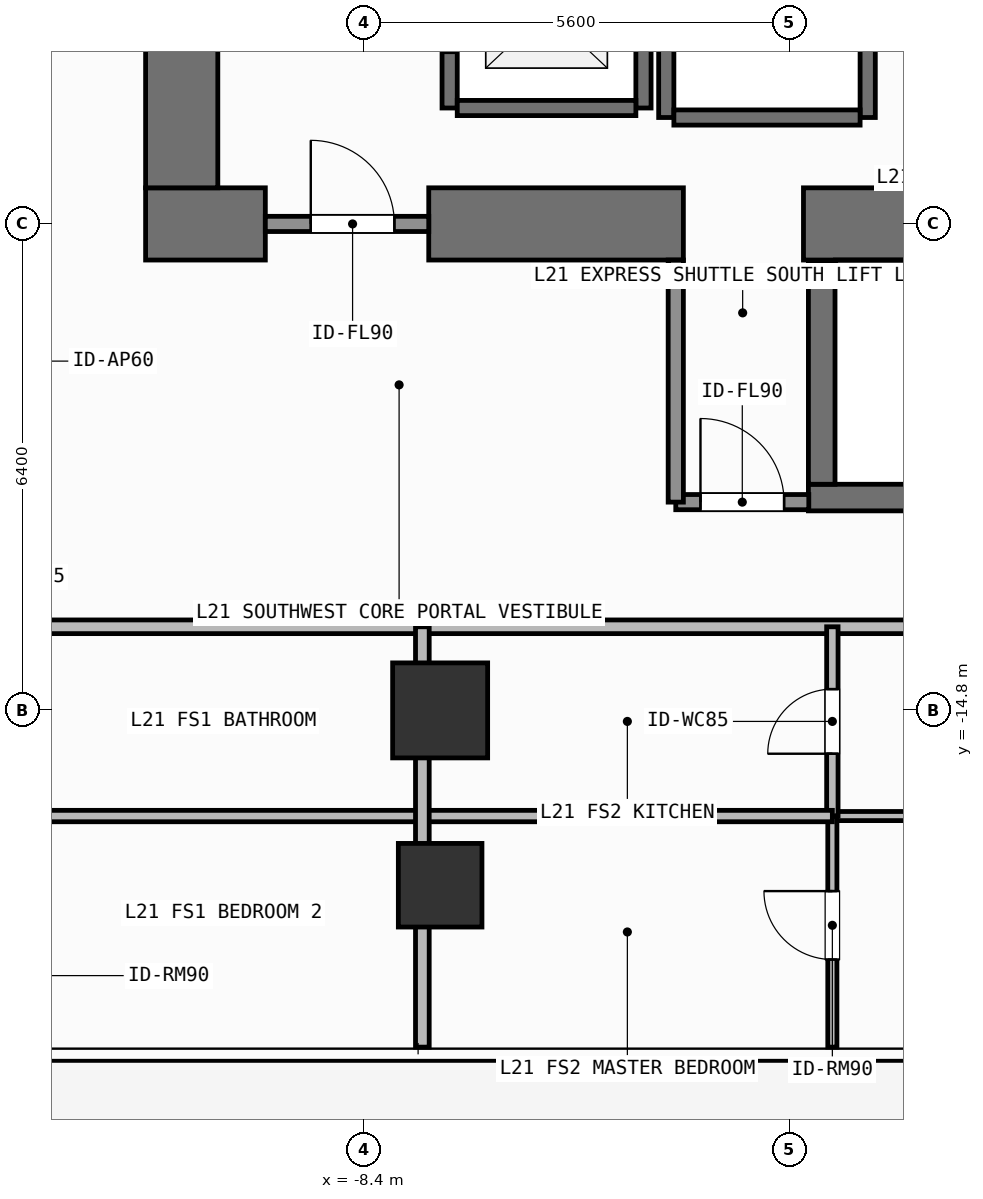
"""IFC4 building model, lengths in metres.
Left out: names, types, materials, properties, quantities, classifications, styles, units other than length and angle.
Written with IfcOpenShell. Run it as: python <this file> out.ifc"""

import sys

from ifc_helpers import new_model, si_unit, direction, frame, frame_2d, origin, origin_2d, place, context, subcontext, project, spatial, rectangle, extrude, element, fill, save


model = new_model("IFC4")
c1 = context("Model", 3, precision=1e-05, world=origin(), true_north=direction((0.0, 1.0)))
c2 = subcontext(c1, "Body", "Model", "MODEL_VIEW")
j1 = project(units=[si_unit("LENGTHUNIT", "METRE"), si_unit("PLANEANGLEUNIT", "RADIAN")], contexts=[c1])
p1 = place(None, origin())
s1 = spatial("IfcSite", under=j1, at=p1, CompositionType="ELEMENT")
p2 = place(p1, origin())
s2 = spatial("IfcBuilding", under=s1, at=p2, CompositionType="ELEMENT")
p3 = place(p2, frame((0.0, 0.0, 85.2)))
s3 = spatial("IfcBuildingStorey", under=s2, at=p3, CompositionType="ELEMENT", Elevation=85.2)
p4 = place(p3, frame((-11.275, -8.4, 0.0), z_axis=(0.0, 0.0, 1.0), x_axis=(1.0, 0.0, 0.0)))
e1 = element("IfcWall", 1, at=p4, inside=s3, PredefinedType="SHEAR", context=c2, shape_type="SweptSolid", body=[
    extrude(rectangle(XDim=1.575, YDim=0.95, at=frame_2d((0.788, 0.0))), origin(), (0.0, 0.0, 1.0), 3.9),
])
p5 = place(p3, frame((-7.55, -8.4, 0.0), z_axis=(0.0, 0.0, 1.0), x_axis=(1.0, 0.0, 0.0)))
e2 = element("IfcWall", 2, at=p5, inside=s3, PredefinedType="SHEAR", context=c2, shape_type="SweptSolid", body=[
    extrude(rectangle(XDim=3.35, YDim=0.95, at=frame_2d((1.675, 0.0))), origin(), (0.0, 0.0, 1.0), 3.9),
])
p6 = place(p3, frame((-2.62, -8.4, 0.0), z_axis=(0.0, 0.0, 1.0), x_axis=(1.0, 0.0, 0.0)))
e3 = element("IfcWall", 3, at=p6, inside=s3, PredefinedType="SHEAR", context=c2, shape_type="SweptSolid", body=[
    extrude(rectangle(XDim=7.27, YDim=0.95, at=frame_2d((3.635, 0.0))), origin(), (0.0, 0.0, 1.0), 3.9),
])
p7 = place(p3, frame((-10.8, -7.925, 0.0), z_axis=(0.0, 0.0, 1.0), x_axis=(0.0, 1.0, 0.0)))
e4 = element("IfcWall", 4, at=p7, inside=s3, PredefinedType="SHEAR", context=c2, shape_type="SweptSolid", body=[
    extrude(rectangle(XDim=15.85, YDim=0.95, at=frame_2d((7.925, 0.0))), origin(), (0.0, 0.0, 1.0), 3.9),
])
p8 = place(p3, frame((-2.555, -12.0, 0.0), z_axis=(0.0, 0.0, 1.0), x_axis=(1.0, 0.0, 0.0)))
e5 = element("IfcWall", 5, at=p8, inside=s3, PredefinedType="SHEAR", context=c2, shape_type="SweptSolid", body=[
    extrude(rectangle(XDim=7.31, YDim=0.35, at=frame_2d((3.655, 0.0))), origin(), (0.0, 0.0, 1.0), 3.9),
])
p9 = place(p3, frame((-2.2, -8.95, 0.0), z_axis=(0.0, 0.0, 1.0), x_axis=(1.0, 0.0, 0.0)))
e6 = element("IfcWall", 6, at=p9, inside=s3, PredefinedType="SHEAR", context=c2, shape_type="SweptSolid", body=[
    extrude(rectangle(XDim=6.6, YDim=0.15, at=frame_2d((3.3, 0.0))), origin(), (0.0, 0.0, 1.0), 3.9),
])
p10 = place(p3, frame((-2.38, -11.825, 0.0), z_axis=(0.0, 0.0, 1.0), x_axis=(0.0, 1.0, 0.0)))
e7 = element("IfcWall", 7, at=p10, inside=s3, PredefinedType="SHEAR", context=c2, shape_type="SweptSolid", body=[
    extrude(rectangle(XDim=2.925, YDim=0.35, at=frame_2d((1.462, 0.0))), origin(), (0.0, 0.0, 1.0), 3.9),
])
p11 = place(p3, frame((-7.4, -14.8, 0.0), z_axis=(0.0, 0.0, 1.0), x_axis=(1.0, 0.0, 0.0)))
e8 = element("IfcColumn", 8, at=p11, inside=s3, PredefinedType="COLUMN", context=c2, shape_type="SweptSolid", body=[
    extrude(rectangle(XDim=1.25, YDim=1.25, at=origin_2d()), origin(), (0.0, 0.0, 1.0), 3.9),
])
p12 = place(p3, frame((-7.4, -17.1, 0.0), z_axis=(0.0, 0.0, 1.0), x_axis=(1.0, 0.0, 0.0)))
e9 = element("IfcColumn", 9, at=p12, inside=s3, PredefinedType="COLUMN", context=c2, shape_type="SweptSolid", body=[
    extrude(rectangle(XDim=1.1, YDim=1.1, at=origin_2d()), origin(), (0.0, 0.0, 1.0), 3.9),
])
p13 = place(p3, frame((-7.275, -6.875, 0.0), z_axis=(0.0, 0.0, 1.0), x_axis=(0.0, 1.0, 0.0)))
e10 = element("IfcWall", 10, at=p13, inside=s3, PredefinedType="SHEAR", context=c2, shape_type="SweptSolid", body=[
    extrude(rectangle(XDim=2.55, YDim=0.2, at=frame_2d((1.275, 0.0))), origin(), (0.0, 0.0, 1.0), 3.68),
])
p14 = place(p13, frame((0.725, 0.0, 0.0)))
e11 = element("IfcOpeningElement", 11, at=p14, cuts=e10, PredefinedType="OPENING", context=c2, shape_type="SweptSolid", body=[
    extrude(rectangle(XDim=1.1, YDim=2.2, at=frame_2d((0.55, 1.1))), frame((0.0, 0.11, 0.0), z_axis=(0.0, -1.0, 0.0), x_axis=(1.0, 0.0, 0.0)), (0.0, 0.0, 1.0), 0.22),
])
p15 = place(p3, frame((-4.725, -6.875, 0.0), z_axis=(0.0, 0.0, 1.0), x_axis=(0.0, 1.0, 0.0)))
e12 = element("IfcWall", 12, at=p15, inside=s3, PredefinedType="SHEAR", context=c2, shape_type="SweptSolid", body=[
    extrude(rectangle(XDim=2.55, YDim=0.2, at=frame_2d((1.275, 0.0))), origin(), (0.0, 0.0, 1.0), 3.68),
])
p16 = place(p3, frame((-7.175, -6.875, 0.0), z_axis=(0.0, 0.0, 1.0), x_axis=(1.0, 0.0, 0.0)))
e13 = element("IfcWall", 13, at=p16, inside=s3, PredefinedType="SHEAR", context=c2, shape_type="SweptSolid", body=[
    extrude(rectangle(XDim=2.35, YDim=0.2, at=frame_2d((1.175, 0.0))), origin(), (0.0, 0.0, 1.0), 3.68),
])
for number, where, z_axis, x_axis in (
    (14, (-4.425, -7.0, 0.0), (0.0, 0.0, 1.0), (0.0, 1.0, 0.0)),
    (15, (-1.775, -7.0, 0.0), (0.0, 0.0, 1.0), (0.0, 1.0, 0.0)),
):
    element("IfcWall", number, at=place(p3, frame(where, z_axis=z_axis, x_axis=x_axis)), inside=s3, PredefinedType="SHEAR", context=c2, shape_type="SweptSolid", body=[
        extrude(rectangle(XDim=2.8, YDim=0.2, at=frame_2d((1.4, 0.0))), origin(), (0.0, 0.0, 1.0), 3.68),
    ])
p17 = place(p3, frame((-4.325, -7.0, 0.0), z_axis=(0.0, 0.0, 1.0), x_axis=(1.0, 0.0, 0.0)))
e16 = element("IfcWall", 16, at=p17, inside=s3, PredefinedType="SHEAR", context=c2, shape_type="SweptSolid", body=[
    extrude(rectangle(XDim=2.45, YDim=0.2, at=frame_2d((1.225, 0.0))), origin(), (0.0, 0.0, 1.0), 3.68),
])
p18 = place(p3, frame((-9.7, -8.4, 0.0), z_axis=(0.0, 0.0, 1.0), x_axis=(1.0, 0.0, 0.0)))
e17 = element("IfcWall", 17, at=p18, inside=s3, PredefinedType="SOLIDWALL", context=c2, shape_type="SweptSolid", body=[
    extrude(rectangle(XDim=2.15, YDim=0.2, at=frame_2d((1.075, 0.0))), origin(), (0.0, 0.0, 1.0), 2.72),
])
p19 = place(p18, frame((0.598, 0.0, 0.0)))
e18 = element("IfcOpeningElement", 18, at=p19, cuts=e17, PredefinedType="OPENING", context=c2, shape_type="SweptSolid", body=[
    extrude(rectangle(XDim=1.1, YDim=2.15, at=frame_2d((0.55, 1.075))), frame((0.0, 0.11, 0.0), z_axis=(0.0, -1.0, 0.0), x_axis=(1.0, 0.0, 0.0)), (0.0, 0.0, 1.0), 0.22),
])
p20 = place(p3, frame((-4.3, -12.06, 0.0), z_axis=(0.0, 0.0, 1.0), x_axis=(1.0, 0.0, 0.0)))
e19 = element("IfcWall", 19, at=p20, inside=s3, PredefinedType="SOLIDWALL", context=c2, shape_type="SweptSolid", body=[
    extrude(rectangle(XDim=1.75, YDim=0.2, at=frame_2d((0.875, 0.0))), origin(), (0.0, 0.0, 1.0), 3.68),
])
p21 = place(p20, frame((0.325, 0.0, 0.0)))
e20 = element("IfcOpeningElement", 20, at=p21, cuts=e19, PredefinedType="OPENING", context=c2, shape_type="SweptSolid", body=[
    extrude(rectangle(XDim=1.1, YDim=2.15, at=frame_2d((0.55, 1.075))), frame((0.0, 0.11, 0.0), z_axis=(0.0, -1.0, 0.0), x_axis=(1.0, 0.0, 0.0)), (0.0, 0.0, 1.0), 0.22),
])
p22 = place(p3, frame((-24.42, -13.7, 0.0), z_axis=(0.0, 0.0, 1.0), x_axis=(1.0, 0.0, 0.0)))
e21 = element("IfcWall", 21, at=p22, inside=s3, PredefinedType="PARTITIONING", context=c2, shape_type="SweptSolid", body=[
    extrude(rectangle(XDim=16.786, YDim=0.18, at=frame_2d((8.393, 0.0))), origin(), (0.0, 0.0, 1.0), 3.68),
])
p23 = place(p22, frame((7.174, 0.0, 0.0)))
e22 = element("IfcOpeningElement", 22, at=p23, cuts=e21, PredefinedType="OPENING", context=c2, shape_type="SweptSolid", body=[
    extrude(rectangle(XDim=1.0, YDim=2.2, at=frame_2d((0.5, 1.1))), frame((0.0, 0.1, 0.0), z_axis=(0.0, -1.0, 0.0), x_axis=(1.0, 0.0, 0.0)), (0.0, 0.0, 1.0), 0.2),
])
p24 = place(p3, frame((-7.634, -13.7, 0.0), z_axis=(0.0, 0.0, 1.0), x_axis=(1.0, 0.0, 0.0)))
e23 = element("IfcWall", 23, at=p24, inside=s3, PredefinedType="PARTITIONING", context=c2, shape_type="SweptSolid", body=[
    extrude(rectangle(XDim=26.254, YDim=0.18, at=frame_2d((13.127, 0.0))), origin(), (0.0, 0.0, 1.0), 3.68),
])
p25 = place(p24, frame((12.178, 0.0, 0.0)))
e24 = element("IfcOpeningElement", 24, at=p25, cuts=e23, PredefinedType="OPENING", context=c2, shape_type="SweptSolid", body=[
    extrude(rectangle(XDim=1.0, YDim=2.2, at=frame_2d((0.5, 1.1))), frame((0.0, 0.1, 0.0), z_axis=(0.0, -1.0, 0.0), x_axis=(1.0, 0.0, 0.0)), (0.0, 0.0, 1.0), 0.2),
])
p26 = place(p3, frame((-2.24, -16.19, 0.0), z_axis=(0.0, 0.0, 1.0), x_axis=(1.0, 0.0, 0.0)))
e25 = element("IfcWall", 25, at=p26, inside=s3, PredefinedType="PARTITIONING", context=c2, shape_type="SweptSolid", body=[
    extrude(rectangle(XDim=14.654, YDim=0.12, at=frame_2d((7.327, 0.0))), origin(), (0.0, 0.0, 1.0), 3.68),
])
p27 = place(p26, frame((6.787, 0.0, 0.0)))
e26 = element("IfcOpeningElement", 26, at=p27, cuts=e25, PredefinedType="OPENING", context=c2, shape_type="SweptSolid", body=[
    extrude(rectangle(XDim=0.9, YDim=2.1, at=frame_2d((0.45, 1.05))), frame((0.0, 0.07, 0.0), z_axis=(0.0, -1.0, 0.0), x_axis=(1.0, 0.0, 0.0)), (0.0, 0.0, 1.0), 0.14),
])
p28 = place(p3, frame((-2.24, -16.19, 0.0), z_axis=(0.0, 0.0, 1.0), x_axis=(0.0, 1.0, 0.0)))
e27 = element("IfcWall", 27, at=p28, inside=s3, PredefinedType="PARTITIONING", context=c2, shape_type="SweptSolid", body=[
    extrude(rectangle(XDim=2.49, YDim=0.15, at=frame_2d((1.245, 0.0))), origin(), (0.0, 0.0, 1.0), 3.68),
])
p29 = place(p28, frame((0.82, 0.0, 0.0)))
e28 = element("IfcOpeningElement", 28, at=p29, cuts=e27, PredefinedType="OPENING", context=c2, shape_type="SweptSolid", body=[
    extrude(rectangle(XDim=0.85, YDim=2.1, at=frame_2d((0.425, 1.05))), frame((0.0, 0.085, 0.0), z_axis=(0.0, -1.0, 0.0), x_axis=(1.0, 0.0, 0.0)), (0.0, 0.0, 1.0), 0.17),
])
p30 = place(p3, frame((-2.24, -19.23, 0.0), z_axis=(0.0, 0.0, 1.0), x_axis=(0.0, 1.0, 0.0)))
e29 = element("IfcWall", 29, at=p30, inside=s3, PredefinedType="PARTITIONING", context=c2, shape_type="SweptSolid", body=[
    extrude(rectangle(XDim=3.04, YDim=0.12, at=frame_2d((1.52, 0.0))), origin(), (0.0, 0.0, 1.0), 3.68),
])
p31 = place(p30, frame((1.153, 0.0, 0.0)))
e30 = element("IfcOpeningElement", 30, at=p31, cuts=e29, PredefinedType="OPENING", context=c2, shape_type="SweptSolid", body=[
    extrude(rectangle(XDim=0.9, YDim=2.1, at=frame_2d((0.45, 1.05))), frame((0.0, 0.07, 0.0), z_axis=(0.0, -1.0, 0.0), x_axis=(1.0, 0.0, 0.0)), (0.0, 0.0, 1.0), 0.14),
])
p32 = place(p3, frame((-4.3, -12.06, 0.0), z_axis=(0.0, 0.0, 1.0), x_axis=(0.0, 1.0, 0.0)))
e31 = element("IfcWall", 31, at=p32, inside=s3, PredefinedType="SOLIDWALL", context=c2, shape_type="SweptSolid", body=[
    extrude(rectangle(XDim=3.185, YDim=0.2, at=frame_2d((1.593, 0.0))), origin(), (0.0, 0.0, 1.0), 3.68),
])
p33 = place(p3, frame((-12.871, -16.19, 0.0), z_axis=(0.0, 0.0, 1.0), x_axis=(1.0, 0.0, 0.0)))
e32 = element("IfcWall", 32, at=p33, inside=s3, PredefinedType="PARTITIONING", context=c2, shape_type="SweptSolid", body=[
    extrude(rectangle(XDim=5.237, YDim=0.15, at=frame_2d((2.619, 0.0))), origin(), (0.0, 0.0, 1.0), 3.68),
])
p34 = place(p3, frame((-7.634, -16.19, 0.0), z_axis=(0.0, 0.0, 1.0), x_axis=(1.0, 0.0, 0.0)))
e33 = element("IfcWall", 33, at=p34, inside=s3, PredefinedType="PARTITIONING", context=c2, shape_type="SweptSolid", body=[
    extrude(rectangle(XDim=5.394, YDim=0.15, at=frame_2d((2.697, 0.0))), origin(), (0.0, 0.0, 1.0), 3.68),
])
p35 = place(p3, frame((-7.634, -19.23, 0.0), z_axis=(0.0, 0.0, 1.0), x_axis=(0.0, 1.0, 0.0)))
e34 = element("IfcWall", 34, at=p35, inside=s3, PredefinedType="PARTITIONING", context=c2, shape_type="SweptSolid", body=[
    extrude(rectangle(XDim=5.53, YDim=0.18, at=frame_2d((2.765, 0.0))), origin(), (0.0, 0.0, 1.0), 3.082),
])
p36 = place(p14, origin())
e35 = element("IfcDoor", 35, at=p36, inside=s3, OperationType="SLIDING_TO_LEFT", PredefinedType="DOOR", context=c2, shape_type="SweptSolid", body=[
    extrude(rectangle(XDim=1.1, YDim=2.2, at=frame_2d((0.55, 1.1))), frame((0.0, 0.025, 0.0), z_axis=(0.0, -1.0, 0.0), x_axis=(1.0, 0.0, 0.0)), (0.0, 0.0, 1.0), 0.05),
])
fill(e11, e35)
p37 = place(p19, origin())
e36 = element("IfcDoor", 36, at=p37, inside=s3, OperationType="SINGLE_SWING_LEFT", PredefinedType="DOOR", context=c2, shape_type="SweptSolid", body=[
    extrude(rectangle(XDim=1.1, YDim=2.15, at=frame_2d((0.55, 1.075))), frame((0.0, 0.025, 0.0), z_axis=(0.0, -1.0, 0.0), x_axis=(1.0, 0.0, 0.0)), (0.0, 0.0, 1.0), 0.05),
])
fill(e18, e36)
p38 = place(p21, origin())
e37 = element("IfcDoor", 37, at=p38, inside=s3, OperationType="SINGLE_SWING_LEFT", PredefinedType="DOOR", context=c2, shape_type="SweptSolid", body=[
    extrude(rectangle(XDim=1.1, YDim=2.15, at=frame_2d((0.55, 1.075))), frame((0.0, 0.025, 0.0), z_axis=(0.0, -1.0, 0.0), x_axis=(1.0, 0.0, 0.0)), (0.0, 0.0, 1.0), 0.05),
])
fill(e20, e37)
p39 = place(p29, origin())
e38 = element("IfcDoor", 38, at=p39, inside=s3, OperationType="SINGLE_SWING_LEFT", PredefinedType="DOOR", context=c2, shape_type="SweptSolid", body=[
    extrude(rectangle(XDim=0.85, YDim=2.1, at=frame_2d((0.425, 1.05))), frame((0.0, 0.025, 0.0), z_axis=(0.0, -1.0, 0.0), x_axis=(1.0, 0.0, 0.0)), (0.0, 0.0, 1.0), 0.05),
])
fill(e28, e38)
p40 = place(p31, origin())
e39 = element("IfcDoor", 39, at=p40, inside=s3, OperationType="SINGLE_SWING_RIGHT", PredefinedType="DOOR", context=c2, shape_type="SweptSolid", body=[
    extrude(rectangle(XDim=0.9, YDim=2.1, at=frame_2d((0.45, 1.05))), frame((0.0, 0.025, 0.0), z_axis=(0.0, -1.0, 0.0), x_axis=(1.0, 0.0, 0.0)), (0.0, 0.0, 1.0), 0.05),
])
fill(e30, e39)
save(model, sys.argv[1])
